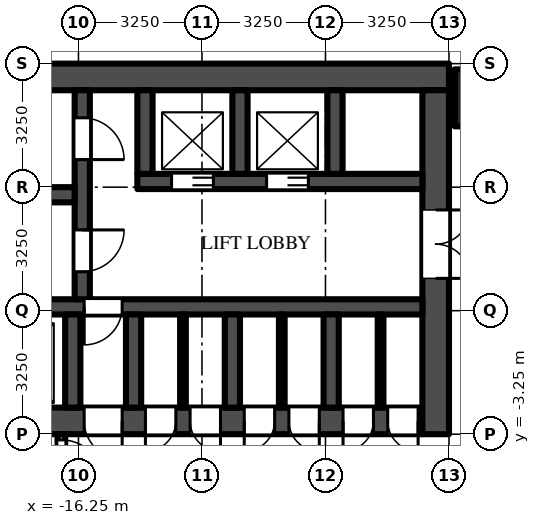
"""IFC4 building model, lengths in metres.
Left out: names, types, materials, properties, quantities, classifications, styles, units other than length and angle.
Written with IfcOpenShell. Run it as: python <this file> out.ifc"""

import sys

from ifc_helpers import new_model, si_unit, direction, frame, frame_2d, origin, origin_2d, place, context, subcontext, project, spatial, rectangle, extrude, source, transform, mapped, element, fill, save


model = new_model("IFC4")
c1 = context("Model", 3, precision=1e-05, world=origin(), true_north=direction((0.0, 1.0)))
c2 = subcontext(c1, "Body", "Model", "MODEL_VIEW")
j1 = project(units=[si_unit("LENGTHUNIT", "METRE"), si_unit("PLANEANGLEUNIT", "RADIAN")], contexts=[c1])
p1 = place(None, origin())
s1 = spatial("IfcSite", under=j1, at=p1, CompositionType="ELEMENT")
p2 = place(p1, origin())
s2 = spatial("IfcBuilding", under=s1, at=p2, CompositionType="ELEMENT")
p3 = place(p2, frame((0.0, 0.0, 29.0)))
s3 = spatial("IfcBuildingStorey", under=s2, at=p3, CompositionType="ELEMENT", Elevation=29.0)
m1 = source(origin(), c2, "Body", "SweptSolid", [
    extrude(rectangle(XDim=1.5, YDim=1.5, at=origin_2d()), origin(), (0.0, 0.0, 1.0), 5.0),
])
p4 = place(p3, frame((-5.6, 5.6, 0.0), z_axis=(0.0, 0.0, 1.0), x_axis=(1.0, 0.0, 0.0)))
e1 = element("IfcColumn", 1, at=p4, inside=s3, PredefinedType="COLUMN", context=c2, shape_type="MappedRepresentation", body=[
    mapped(m1, transform((0.0, 0.0, 0.0))),
])
m2 = source(origin(), c2, "Body", "SweptSolid", [
    extrude(rectangle(XDim=16.25, YDim=0.7, at=frame_2d((8.125, 0.0))), origin(), (0.0, 0.0, 1.0), 4.65),
])
p5 = place(p3, frame((-6.5, 6.15, 0.0), z_axis=(0.0, 0.0, 1.0), x_axis=(-1.0, 0.0, 0.0)))
e2 = element("IfcWall", 2, at=p5, inside=s3, PredefinedType="SHEAR", context=c2, shape_type="MappedRepresentation", body=[
    mapped(m2, transform((0.0, 0.0, 0.0))),
])
m3 = source(origin(), c2, "Body", "SweptSolid", [
    extrude(rectangle(XDim=14.85, YDim=0.7, at=frame_2d((7.425, 0.0))), origin(), (0.0, 0.0, 1.0), 4.65),
])
p6 = place(p3, frame((-7.2, -2.9, 0.0), z_axis=(0.0, 0.0, 1.0), x_axis=(-1.0, 0.0, 0.0)))
e3 = element("IfcWall", 3, at=p6, inside=s3, PredefinedType="SHEAR", context=c2, shape_type="MappedRepresentation", body=[
    mapped(m3, transform((0.0, 0.0, 0.0))),
])
m4 = source(origin(), c2, "Body", "SweptSolid", [
    extrude(rectangle(XDim=1.3, YDim=2.1, at=frame_2d((0.65, 1.05))), frame((0.0, 0.36, 0.0), z_axis=(0.0, -1.0, 0.0), x_axis=(1.0, 0.0, 0.0)), (0.0, 0.0, 1.0), 0.72),
])
p7 = place(p6, frame((12.2, 0.0, 0.0)))
e4 = element("IfcOpeningElement", 4, at=p7, cuts=e3, PredefinedType="OPENING", context=c2, shape_type="MappedRepresentation", body=[
    mapped(m4, transform((0.0, 0.0, 0.0))),
])
m5 = source(origin(), c2, "Body", "SweptSolid", [
    extrude(rectangle(XDim=1.2, YDim=2.1, at=frame_2d((0.6, 1.05))), frame((0.0, 0.36, 0.0), z_axis=(0.0, -1.0, 0.0), x_axis=(1.0, 0.0, 0.0)), (0.0, 0.0, 1.0), 0.72),
])
p8 = place(p6, frame((9.85, 0.0, 0.0)))
e5 = element("IfcOpeningElement", 5, at=p8, cuts=e3, PredefinedType="OPENING", context=c2, shape_type="MappedRepresentation", body=[
    mapped(m5, transform((0.0, 0.0, 0.0))),
])
m6 = source(origin(), c2, "Body", "SweptSolid", [
    extrude(rectangle(XDim=1.0, YDim=2.1, at=frame_2d((0.5, 1.05))), frame((0.0, 0.36, 0.0), z_axis=(0.0, -1.0, 0.0), x_axis=(1.0, 0.0, 0.0)), (0.0, 0.0, 1.0), 0.72),
])
p9 = place(p6, frame((7.9, 0.0, 0.0)))
e6 = element("IfcOpeningElement", 6, at=p9, cuts=e3, PredefinedType="OPENING", context=c2, shape_type="MappedRepresentation", body=[
    mapped(m6, transform((0.0, 0.0, 0.0))),
])
m7 = source(origin(), c2, "Body", "SweptSolid", [
    extrude(rectangle(XDim=0.8, YDim=2.1, at=frame_2d((0.4, 1.05))), frame((0.0, 0.36, 0.0), z_axis=(0.0, -1.0, 0.0), x_axis=(1.0, 0.0, 0.0)), (0.0, 0.0, 1.0), 0.72),
])
p10 = place(p6, frame((0.113, 0.0, 0.0)))
e7 = element("IfcOpeningElement", 7, at=p10, cuts=e3, PredefinedType="OPENING", context=c2, shape_type="MappedRepresentation", body=[
    mapped(m7, transform((0.0, 0.0, 0.0))),
])
p11 = place(p6, frame((1.288, 0.0, 0.0)))
e8 = element("IfcOpeningElement", 8, at=p11, cuts=e3, PredefinedType="OPENING", context=c2, shape_type="MappedRepresentation", body=[
    mapped(m7, transform((0.0, 0.0, 0.0))),
])
p12 = place(p6, frame((2.712, 0.0, 0.0)))
e9 = element("IfcOpeningElement", 9, at=p12, cuts=e3, PredefinedType="OPENING", context=c2, shape_type="MappedRepresentation", body=[
    mapped(m7, transform((0.0, 0.0, 0.0))),
])
p13 = place(p6, frame((3.887, 0.0, 0.0)))
e10 = element("IfcOpeningElement", 10, at=p13, cuts=e3, PredefinedType="OPENING", context=c2, shape_type="MappedRepresentation", body=[
    mapped(m7, transform((0.0, 0.0, 0.0))),
])
p14 = place(p6, frame((5.312, 0.0, 0.0)))
e11 = element("IfcOpeningElement", 11, at=p14, cuts=e3, PredefinedType="OPENING", context=c2, shape_type="MappedRepresentation", body=[
    mapped(m7, transform((0.0, 0.0, 0.0))),
])
p15 = place(p6, frame((6.488, 0.0, 0.0)))
e12 = element("IfcOpeningElement", 12, at=p15, cuts=e3, PredefinedType="OPENING", context=c2, shape_type="MappedRepresentation", body=[
    mapped(m7, transform((0.0, 0.0, 0.0))),
])
m8 = source(origin(), c2, "Body", "SweptSolid", [
    extrude(rectangle(XDim=9.05, YDim=0.7, at=frame_2d((4.525, 0.0))), origin(), (0.0, 0.0, 1.0), 4.65),
])
p16 = place(p3, frame((-6.85, 5.8, 0.0), z_axis=(0.0, 0.0, 1.0), x_axis=(0.0, -1.0, 0.0)))
e13 = element("IfcWall", 13, at=p16, inside=s3, PredefinedType="SHEAR", context=c2, shape_type="MappedRepresentation", body=[
    mapped(m8, transform((0.0, 0.0, 0.0))),
])
m9 = source(origin(), c2, "Body", "SweptSolid", [
    extrude(rectangle(XDim=1.8, YDim=2.1, at=frame_2d((0.9, 1.05))), frame((0.0, 0.36, 0.0), z_axis=(0.0, -1.0, 0.0), x_axis=(1.0, 0.0, 0.0)), (0.0, 0.0, 1.0), 0.72),
])
p17 = place(p16, frame((3.15, 0.0, 0.0)))
e14 = element("IfcOpeningElement", 14, at=p17, cuts=e13, PredefinedType="OPENING", context=c2, shape_type="MappedRepresentation", body=[
    mapped(m9, transform((0.0, 0.0, 0.0))),
])
m10 = source(origin(), c2, "Body", "SweptSolid", [
    extrude(rectangle(XDim=7.5, YDim=0.4, at=frame_2d((3.75, 0.0))), origin(), (0.0, 0.0, 1.0), 4.65),
])
p18 = place(p3, frame((-7.2, 3.4, 0.0), z_axis=(0.0, 0.0, 1.0), x_axis=(-1.0, 0.0, 0.0)))
e15 = element("IfcWall", 15, at=p18, inside=s3, PredefinedType="SHEAR", context=c2, shape_type="MappedRepresentation", body=[
    mapped(m10, transform((0.0, 0.0, 0.0))),
])
m11 = source(origin(), c2, "Body", "SweptSolid", [
    extrude(rectangle(XDim=1.1, YDim=2.1, at=frame_2d((0.55, 1.05))), frame((0.0, 0.21, 0.0), z_axis=(0.0, -1.0, 0.0), x_axis=(1.0, 0.0, 0.0)), (0.0, 0.0, 1.0), 0.42),
])
p19 = place(p18, frame((3.0, 0.0, 0.0)))
e16 = element("IfcOpeningElement", 16, at=p19, cuts=e15, PredefinedType="OPENING", context=c2, shape_type="MappedRepresentation", body=[
    mapped(m11, transform((0.0, 0.0, 0.0))),
])
p20 = place(p18, frame((5.5, 0.0, 0.0)))
e17 = element("IfcOpeningElement", 17, at=p20, cuts=e15, PredefinedType="OPENING", context=c2, shape_type="MappedRepresentation", body=[
    mapped(m11, transform((0.0, 0.0, 0.0))),
])
m12 = source(origin(), c2, "Body", "SweptSolid", [
    extrude(rectangle(XDim=14.85, YDim=0.4, at=frame_2d((7.425, 0.0))), origin(), (0.0, 0.0, 1.0), 4.65),
])
p21 = place(p3, frame((-7.2, 0.1, 0.0), z_axis=(0.0, 0.0, 1.0), x_axis=(-1.0, 0.0, 0.0)))
e18 = element("IfcWall", 18, at=p21, inside=s3, PredefinedType="SHEAR", context=c2, shape_type="MappedRepresentation", body=[
    mapped(m12, transform((0.0, 0.0, 0.0))),
])
m13 = source(origin(), c2, "Body", "SweptSolid", [
    extrude(rectangle(XDim=1.0, YDim=2.1, at=frame_2d((0.5, 1.05))), frame((0.0, 0.21, 0.0), z_axis=(0.0, -1.0, 0.0), x_axis=(1.0, 0.0, 0.0)), (0.0, 0.0, 1.0), 0.42),
])
p22 = place(p21, frame((7.9, 0.0, 0.0)))
e19 = element("IfcOpeningElement", 19, at=p22, cuts=e18, PredefinedType="OPENING", context=c2, shape_type="MappedRepresentation", body=[
    mapped(m13, transform((0.0, 0.0, 0.0))),
])
m14 = source(origin(), c2, "Body", "SweptSolid", [
    extrude(rectangle(XDim=5.5, YDim=0.4, at=frame_2d((2.75, 0.0))), origin(), (0.0, 0.0, 1.0), 4.65),
])
p23 = place(p3, frame((-16.15, 5.8, 0.0), z_axis=(0.0, 0.0, 1.0), x_axis=(0.0, -1.0, 0.0)))
e20 = element("IfcWall", 20, at=p23, inside=s3, PredefinedType="SHEAR", context=c2, shape_type="MappedRepresentation", body=[
    mapped(m14, transform((0.0, 0.0, 0.0))),
])
p24 = place(p23, frame((0.725, 0.0, 0.0)))
e21 = element("IfcOpeningElement", 21, at=p24, cuts=e20, PredefinedType="OPENING", context=c2, shape_type="MappedRepresentation", body=[
    mapped(m11, transform((0.0, 0.0, 0.0))),
])
p25 = place(p23, frame((3.675, 0.0, 0.0)))
e22 = element("IfcOpeningElement", 22, at=p25, cuts=e20, PredefinedType="OPENING", context=c2, shape_type="MappedRepresentation", body=[
    mapped(m11, transform((0.0, 0.0, 0.0))),
])
m15 = source(origin(), c2, "Body", "SweptSolid", [
    extrude(rectangle(XDim=5.7, YDim=0.4, at=frame_2d((2.85, 0.0))), origin(), (0.0, 0.0, 1.0), 4.65),
])
p26 = place(p3, frame((-16.35, 3.05, 0.0), z_axis=(0.0, 0.0, 1.0), x_axis=(-1.0, 0.0, 0.0)))
e23 = element("IfcWall", 23, at=p26, inside=s3, PredefinedType="SHEAR", context=c2, shape_type="MappedRepresentation", body=[
    mapped(m15, transform((0.0, 0.0, 0.0))),
])
m16 = source(origin(), c2, "Body", "SweptSolid", [
    extrude(rectangle(XDim=2.2, YDim=0.4, at=frame_2d((1.1, 0.0))), origin(), (0.0, 0.0, 1.0), 4.65),
])
for number, where, z_axis, x_axis in (
    (24, (-9.5, 5.8, 0.0), (0.0, 0.0, 1.0), (0.0, -1.0, 0.0)),
    (25, (-12.0, 5.8, 0.0), (0.0, 0.0, 1.0), (0.0, -1.0, 0.0)),
    (26, (-14.5, 5.8, 0.0), (0.0, 0.0, 1.0), (0.0, -1.0, 0.0)),
):
    element("IfcWall", number, at=place(p3, frame(where, z_axis=z_axis, x_axis=x_axis)), inside=s3, PredefinedType="SHEAR", context=c2, shape_type="MappedRepresentation", body=[
        mapped(m16, transform((0.0, 0.0, 0.0))),
    ])
m17 = source(origin(), c2, "Body", "SweptSolid", [
    extrude(rectangle(XDim=2.45, YDim=0.4, at=frame_2d((1.225, 0.0))), origin(), (0.0, 0.0, 1.0), 4.65),
])
for number, where, z_axis, x_axis in (
    (27, (-9.6, -0.1, 0.0), (0.0, 0.0, 1.0), (0.0, -1.0, 0.0)),
    (28, (-12.2, -0.1, 0.0), (0.0, 0.0, 1.0), (0.0, -1.0, 0.0)),
    (29, (-14.8, -0.1, 0.0), (0.0, 0.0, 1.0), (0.0, -1.0, 0.0)),
    (30, (-16.4, -0.1, 0.0), (0.0, 0.0, 1.0), (0.0, -1.0, 0.0)),
):
    element("IfcWall", number, at=place(p3, frame(where, z_axis=z_axis, x_axis=x_axis)), inside=s3, PredefinedType="SHEAR", context=c2, shape_type="MappedRepresentation", body=[
        mapped(m17, transform((0.0, 0.0, 0.0))),
    ])
m18 = source(origin(), c2, "Body", "SweptSolid", [
    extrude(rectangle(XDim=3.25, YDim=0.2, at=frame_2d((1.625, 0.0))), origin(), (0.0, 0.0, 1.0), 4.65),
])
p27 = place(p3, frame((-16.7, -3.25, 0.0), z_axis=(0.0, 0.0, 1.0), x_axis=(0.0, -1.0, 0.0)))
e31 = element("IfcWall", 31, at=p27, inside=s3, PredefinedType="PARTITIONING", context=c2, shape_type="MappedRepresentation", body=[
    mapped(m18, transform((0.0, 0.0, 0.0))),
])
m19 = source(origin(), c2, "Body", "SweptSolid", [
    extrude(rectangle(XDim=1.1, YDim=2.1, at=frame_2d((0.55, 1.05))), frame((0.0, 0.11, 0.0), z_axis=(0.0, -1.0, 0.0), x_axis=(1.0, 0.0, 0.0)), (0.0, 0.0, 1.0), 0.22),
])
p28 = place(p27, frame((0.15, 0.0, 0.0)))
e32 = element("IfcOpeningElement", 32, at=p28, cuts=e31, PredefinedType="OPENING", context=c2, shape_type="MappedRepresentation", body=[
    mapped(m19, transform((0.0, 0.0, 0.0))),
])
m20 = source(origin(), c2, "Body", "SweptSolid", [
    extrude(rectangle(XDim=2.45, YDim=0.15, at=frame_2d((1.225, 0.0))), origin(), (0.0, 0.0, 1.0), 4.65),
])
for number, where, z_axis, x_axis in (
    (33, (-8.3, -0.1, 0.0), (0.0, 0.0, 1.0), (0.0, -1.0, 0.0)),
    (34, (-10.9, -0.1, 0.0), (0.0, 0.0, 1.0), (0.0, -1.0, 0.0)),
    (35, (-13.5, -0.1, 0.0), (0.0, 0.0, 1.0), (0.0, -1.0, 0.0)),
):
    element("IfcWall", number, at=place(p3, frame(where, z_axis=z_axis, x_axis=x_axis)), inside=s3, PredefinedType="PARTITIONING", context=c2, shape_type="MappedRepresentation", body=[
        mapped(m20, transform((0.0, 0.0, 0.0))),
    ])
m21 = source(origin(), c2, "Body", "SweptSolid", [
    extrude(rectangle(XDim=1.1, YDim=2.1, at=frame_2d((0.55, 1.05))), frame((0.0, 0.025, 0.0), z_axis=(0.0, -1.0, 0.0), x_axis=(1.0, 0.0, 0.0)), (0.0, 0.0, 1.0), 0.05),
])
p29 = place(p19, origin())
e36 = element("IfcDoor", 36, at=p29, inside=s3, OperationType="DOUBLE_DOOR_SLIDING", PredefinedType="DOOR", context=c2, shape_type="MappedRepresentation", body=[
    mapped(m21, transform((0.0, 0.0, 0.0))),
])
fill(e16, e36)
p30 = place(p20, origin())
e37 = element("IfcDoor", 37, at=p30, inside=s3, OperationType="DOUBLE_DOOR_SLIDING", PredefinedType="DOOR", context=c2, shape_type="MappedRepresentation", body=[
    mapped(m21, transform((0.0, 0.0, 0.0))),
])
fill(e17, e37)
m22 = source(origin(), c2, "Body", "SweptSolid", [
    extrude(rectangle(XDim=1.8, YDim=2.1, at=frame_2d((0.9, 1.05))), frame((0.0, -0.275, 0.0), z_axis=(0.0, -1.0, 0.0), x_axis=(1.0, 0.0, 0.0)), (0.0, 0.0, 1.0), 0.05),
])
p31 = place(p17, origin())
e38 = element("IfcDoor", 38, at=p31, inside=s3, OperationType="DOUBLE_DOOR_SINGLE_SWING", PredefinedType="DOOR", context=c2, shape_type="MappedRepresentation", body=[
    mapped(m22, transform((0.0, 0.0, 0.0))),
])
fill(e14, e38)
p32 = place(p24, origin())
e39 = element("IfcDoor", 39, at=p32, inside=s3, OperationType="SINGLE_SWING_RIGHT", PredefinedType="DOOR", context=c2, shape_type="MappedRepresentation", body=[
    mapped(m21, transform((0.0, 0.0, 0.0))),
])
fill(e21, e39)
p33 = place(p25, origin())
e40 = element("IfcDoor", 40, at=p33, inside=s3, OperationType="SINGLE_SWING_LEFT", PredefinedType="DOOR", context=c2, shape_type="MappedRepresentation", body=[
    mapped(m21, transform((0.0, 0.0, 0.0))),
])
fill(e22, e40)
m23 = source(origin(), c2, "Body", "SweptSolid", [
    extrude(rectangle(XDim=1.0, YDim=2.1, at=frame_2d((0.5, 1.05))), frame((0.0, 0.025, 0.0), z_axis=(0.0, -1.0, 0.0), x_axis=(1.0, 0.0, 0.0)), (0.0, 0.0, 1.0), 0.05),
])
p34 = place(p22, origin())
e41 = element("IfcDoor", 41, at=p34, inside=s3, OperationType="SINGLE_SWING_RIGHT", PredefinedType="DOOR", context=c2, shape_type="MappedRepresentation", body=[
    mapped(m23, transform((0.0, 0.0, 0.0))),
])
fill(e19, e41)
m24 = source(origin(), c2, "Body", "SweptSolid", [
    extrude(rectangle(XDim=1.0, YDim=2.1, at=frame_2d((0.5, 1.05))), frame((0.0, -0.275, 0.0), z_axis=(0.0, -1.0, 0.0), x_axis=(1.0, 0.0, 0.0)), (0.0, 0.0, 1.0), 0.05),
])
p35 = place(p9, origin())
e42 = element("IfcDoor", 42, at=p35, inside=s3, OperationType="SINGLE_SWING_LEFT", PredefinedType="DOOR", context=c2, shape_type="MappedRepresentation", body=[
    mapped(m24, transform((0.0, 0.0, 0.0))),
])
fill(e6, e42)
p36 = place(p28, origin())
e43 = element("IfcDoor", 43, at=p36, inside=s3, OperationType="SINGLE_SWING_RIGHT", PredefinedType="DOOR", context=c2, shape_type="MappedRepresentation", body=[
    mapped(m21, transform((0.0, 0.0, 0.0))),
])
fill(e32, e43)
m25 = source(origin(), c2, "Body", "SweptSolid", [
    extrude(rectangle(XDim=0.8, YDim=2.1, at=frame_2d((0.4, 1.05))), frame((0.0, -0.275, 0.0), z_axis=(0.0, -1.0, 0.0), x_axis=(1.0, 0.0, 0.0)), (0.0, 0.0, 1.0), 0.05),
])
p37 = place(p10, origin())
e44 = element("IfcDoor", 44, at=p37, inside=s3, OperationType="SINGLE_SWING_LEFT", PredefinedType="DOOR", context=c2, shape_type="MappedRepresentation", body=[
    mapped(m25, transform((0.0, 0.0, 0.0))),
])
fill(e7, e44)
p38 = place(p11, origin())
e45 = element("IfcDoor", 45, at=p38, inside=s3, OperationType="SINGLE_SWING_RIGHT", PredefinedType="DOOR", context=c2, shape_type="MappedRepresentation", body=[
    mapped(m25, transform((0.0, 0.0, 0.0))),
])
fill(e8, e45)
p39 = place(p12, origin())
e46 = element("IfcDoor", 46, at=p39, inside=s3, OperationType="SINGLE_SWING_LEFT", PredefinedType="DOOR", context=c2, shape_type="MappedRepresentation", body=[
    mapped(m25, transform((0.0, 0.0, 0.0))),
])
fill(e9, e46)
p40 = place(p13, origin())
e47 = element("IfcDoor", 47, at=p40, inside=s3, OperationType="SINGLE_SWING_RIGHT", PredefinedType="DOOR", context=c2, shape_type="MappedRepresentation", body=[
    mapped(m25, transform((0.0, 0.0, 0.0))),
])
fill(e10, e47)
p41 = place(p14, origin())
e48 = element("IfcDoor", 48, at=p41, inside=s3, OperationType="SINGLE_SWING_LEFT", PredefinedType="DOOR", context=c2, shape_type="MappedRepresentation", body=[
    mapped(m25, transform((0.0, 0.0, 0.0))),
])
fill(e11, e48)
p42 = place(p15, origin())
e49 = element("IfcDoor", 49, at=p42, inside=s3, OperationType="SINGLE_SWING_RIGHT", PredefinedType="DOOR", context=c2, shape_type="MappedRepresentation", body=[
    mapped(m25, transform((0.0, 0.0, 0.0))),
])
fill(e12, e49)
save(model, sys.argv[1])
